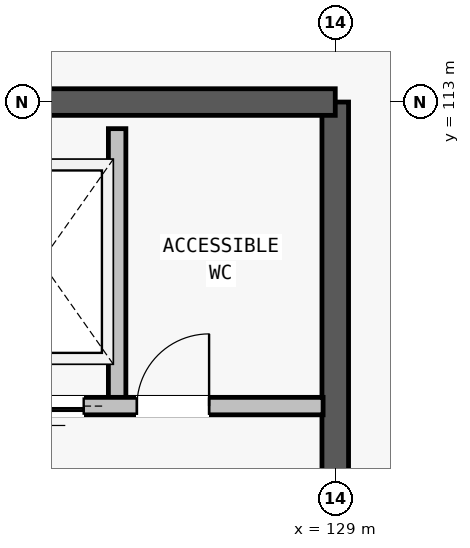
"""IFC4 building model, lengths in metres.
Left out: names, types, materials, properties, quantities, classifications, styles, units other than length and angle.
Written with IfcOpenShell. Run it as: python <this file> out.ifc"""

import sys

from ifc_helpers import new_model, si_unit, direction, frame, frame_2d, origin, place, context, subcontext, project, spatial, rectangle, extrude, element, fill, save


model = new_model("IFC4")
c1 = context("Model", 3, precision=1e-05, world=origin(), true_north=direction((0.0, 1.0)))
c2 = subcontext(c1, "Body", "Model", "MODEL_VIEW")
j1 = project(units=[si_unit("LENGTHUNIT", "METRE"), si_unit("PLANEANGLEUNIT", "RADIAN")], contexts=[c1])
p1 = place(None, origin())
s1 = spatial("IfcSite", under=j1, at=p1, CompositionType="ELEMENT")
p2 = place(p1, origin())
s2 = spatial("IfcBuilding", under=s1, at=p2, CompositionType="ELEMENT")
p3 = place(p2, frame((0.0, 0.0, 17.3)))
s3 = spatial("IfcBuildingStorey", under=s2, at=p3, CompositionType="ELEMENT", Elevation=17.3)
p4 = place(p3, frame((129.0, 104.0, 0.0), z_axis=(0.0, 0.0, 1.0), x_axis=(0.0, 1.0, 0.0)))
e1 = element("IfcWall", 1, at=p4, inside=s3, PredefinedType="SHEAR", context=c2, shape_type="SweptSolid", body=[
    extrude(rectangle(XDim=9.0, YDim=0.35, at=frame_2d((4.5, 0.0))), origin(), (0.0, 0.0, 1.0), 3.62),
])
p5 = place(p4, frame((1.4, 0.0, 0.0)))
e2 = element("IfcOpeningElement", 2, at=p5, cuts=e1, PredefinedType="OPENING", context=c2, shape_type="SweptSolid", body=[
    extrude(rectangle(XDim=1.9, YDim=2.3, at=frame_2d((0.95, 1.15))), frame((0.0, 0.185, 0.0), z_axis=(0.0, -1.0, 0.0), x_axis=(1.0, 0.0, 0.0)), (0.0, 0.0, 1.0), 0.37),
])
p6 = place(p3, frame((129.0, 113.0, 0.0), z_axis=(0.0, 0.0, 1.0), x_axis=(-1.0, 0.0, 0.0)))
e3 = element("IfcWall", 3, at=p6, inside=s3, PredefinedType="SHEAR", context=c2, shape_type="SweptSolid", body=[
    extrude(rectangle(XDim=9.0, YDim=0.35, at=frame_2d((4.5, 0.0))), origin(), (0.0, 0.0, 1.0), 3.62),
])
p7 = place(p3, frame((126.13, 109.0, 0.0), z_axis=(0.0, 0.0, 1.0), x_axis=(0.0, 1.0, 0.0)))
e4 = element("IfcWall", 4, at=p7, inside=s3, PredefinedType="PARTITIONING", context=c2, shape_type="SweptSolid", body=[
    extrude(rectangle(XDim=3.65, YDim=0.23, at=frame_2d((1.825, 0.0))), origin(), (0.0, 0.0, 1.0), 2.48),
])
p8 = place(p3, frame((124.21, 109.0, 0.0), z_axis=(0.0, 0.0, 1.0), x_axis=(1.0, 0.0, 0.0)))
e5 = element("IfcWall", 5, at=p8, inside=s3, PredefinedType="PARTITIONING", context=c2, shape_type="SweptSolid", body=[
    extrude(rectangle(XDim=4.63, YDim=0.23, at=frame_2d((2.315, 0.0))), origin(), (0.0, 0.0, 1.0), 2.48),
])
p9 = place(p8, frame((0.38, 0.0, 0.0)))
e6 = element("IfcOpeningElement", 6, at=p9, cuts=e5, PredefinedType="OPENING", context=c2, shape_type="SweptSolid", body=[
    extrude(rectangle(XDim=1.1, YDim=2.15, at=frame_2d((0.55, 1.075))), frame((0.0, 0.125, 0.0), z_axis=(0.0, -1.0, 0.0), x_axis=(1.0, 0.0, 0.0)), (0.0, 0.0, 1.0), 0.25),
])
p10 = place(p8, frame((2.18, 0.0, 0.0)))
e7 = element("IfcOpeningElement", 7, at=p10, cuts=e5, PredefinedType="OPENING", context=c2, shape_type="SweptSolid", body=[
    extrude(rectangle(XDim=0.95, YDim=2.1, at=frame_2d((0.475, 1.05))), frame((0.0, 0.125, 0.0), z_axis=(0.0, -1.0, 0.0), x_axis=(1.0, 0.0, 0.0)), (0.0, 0.0, 1.0), 0.25),
])
p11 = place(p9, origin())
e8 = element("IfcDoor", 8, at=p11, inside=s3, OperationType="SLIDING_TO_LEFT", PredefinedType="DOOR", context=c2, shape_type="SweptSolid", body=[
    extrude(rectangle(XDim=1.1, YDim=2.15, at=frame_2d((0.55, 1.075))), frame((0.0, 0.025, 0.0), z_axis=(0.0, -1.0, 0.0), x_axis=(1.0, 0.0, 0.0)), (0.0, 0.0, 1.0), 0.05),
])
fill(e6, e8)
p12 = place(p10, origin())
e9 = element("IfcDoor", 9, at=p12, inside=s3, OperationType="SINGLE_SWING_RIGHT", PredefinedType="DOOR", context=c2, shape_type="SweptSolid", body=[
    extrude(rectangle(XDim=0.95, YDim=2.1, at=frame_2d((0.475, 1.05))), frame((0.0, 0.025, 0.0), z_axis=(0.0, -1.0, 0.0), x_axis=(1.0, 0.0, 0.0)), (0.0, 0.0, 1.0), 0.05),
])
fill(e7, e9)
save(model, sys.argv[1])
